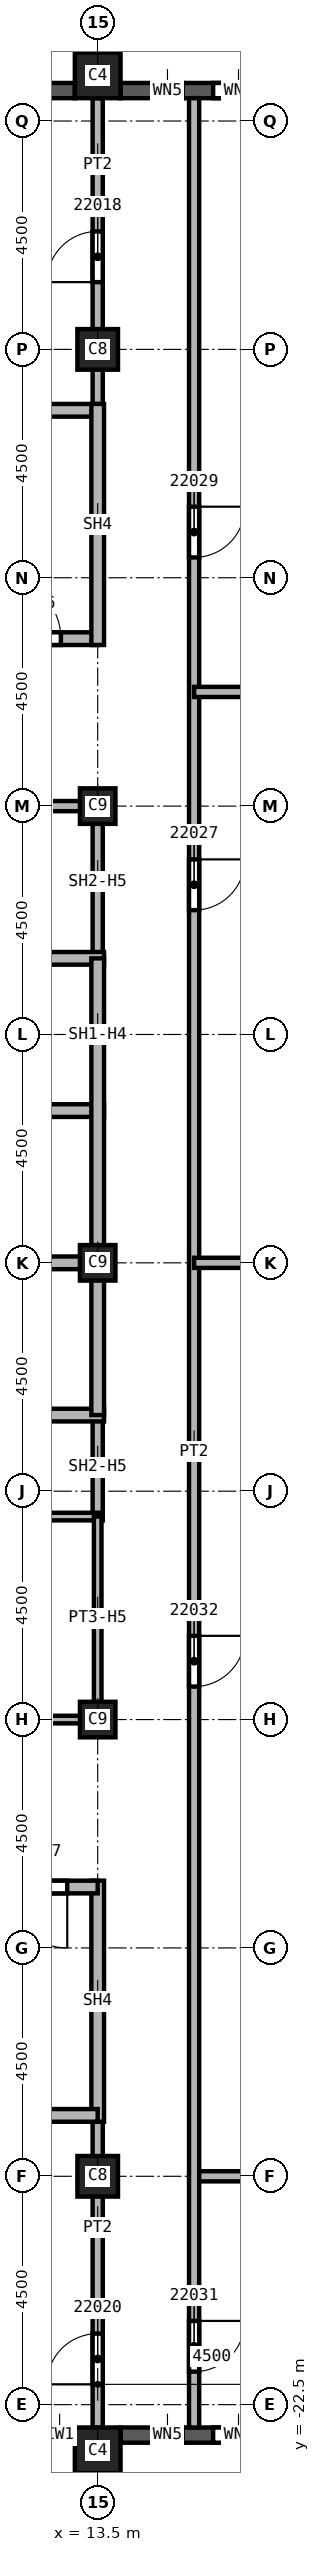
"""IFC4 building model, lengths in metres.
Left out: names, types, materials, properties, quantities, classifications, styles, units other than length and angle.
Written with IfcOpenShell. Run it as: python <this file> out.ifc"""

import sys

from ifc_helpers import new_model, si_unit, direction, frame, frame_2d, origin, origin_2d, place, context, subcontext, project, spatial, rectangle, extrude, element, fill, save


model = new_model("IFC4")
c1 = context("Model", 3, precision=1e-05, world=origin(), true_north=direction((0.0, 1.0)))
c2 = subcontext(c1, "Body", "Model", "MODEL_VIEW")
j1 = project(units=[si_unit("LENGTHUNIT", "METRE"), si_unit("PLANEANGLEUNIT", "RADIAN")], contexts=[c1])
p1 = place(None, origin())
s1 = spatial("IfcSite", under=j1, at=p1, CompositionType="ELEMENT")
p2 = place(p1, origin())
s2 = spatial("IfcBuilding", under=s1, at=p2, CompositionType="ELEMENT")
p3 = place(p2, frame((0.0, 0.0, 316.0)))
s3 = spatial("IfcBuildingStorey", under=s2, at=p3, CompositionType="ELEMENT", Elevation=316.0)
for number, where, z_axis, x_axis in (
    (1, (13.5, 18.0, 0.0), (0.0, 0.0, 1.0), (1.0, 0.0, 0.0)),
    (2, (13.5, -18.0, 0.0), (0.0, 0.0, 1.0), (1.0, 0.0, 0.0)),
):
    element("IfcColumn", number, at=place(p3, frame(where, z_axis=z_axis, x_axis=x_axis)), inside=s3, PredefinedType="COLUMN", context=c2, shape_type="SweptSolid", body=[
        extrude(rectangle(XDim=0.8, YDim=0.8, at=origin_2d()), origin(), (0.0, 0.0, 1.0), 3.59),
    ])
for number, where, z_axis, x_axis in (
    (3, (13.5, 0.0, 0.0), (0.0, 0.0, 1.0), (1.0, 0.0, 0.0)),
    (4, (13.5, 9.0, 0.0), (0.0, 0.0, 1.0), (1.0, 0.0, 0.0)),
    (5, (13.5, -9.0, 0.0), (0.0, 0.0, 1.0), (1.0, 0.0, 0.0)),
):
    element("IfcColumn", number, at=place(p3, frame(where, z_axis=z_axis, x_axis=x_axis)), inside=s3, PredefinedType="COLUMN", context=c2, shape_type="SweptSolid", body=[
        extrude(rectangle(XDim=0.7, YDim=0.7, at=origin_2d()), origin(), (0.0, 0.0, 1.0), 3.59),
    ])
for number, where, z_axis, x_axis in (
    (6, (13.5, 23.4, 0.0), (0.0, 0.0, 1.0), (1.0, 0.0, 0.0)),
    (7, (13.5, -23.4, 0.0), (0.0, 0.0, 1.0), (1.0, 0.0, 0.0)),
):
    element("IfcColumn", number, at=place(p3, frame(where, z_axis=z_axis, x_axis=x_axis)), inside=s3, PredefinedType="COLUMN", context=c2, shape_type="SweptSolid", body=[
        extrude(rectangle(XDim=0.9, YDim=0.9, at=origin_2d()), origin(), (0.0, 0.0, 1.0), 3.59),
    ])
p4 = place(p3, frame((9.45, -23.1, 0.0), z_axis=(0.0, 0.0, 1.0), x_axis=(1.0, 0.0, 0.0)))
e8 = element("IfcWall", 8, at=p4, inside=s3, PredefinedType="SOLIDWALL", context=c2, shape_type="SweptSolid", body=[
    extrude(rectangle(XDim=3.6, YDim=0.3, at=frame_2d((1.8, 0.0))), origin(), (0.0, 0.0, 1.0), 2.99),
])
p5 = place(p4, frame((0.6, 0.0, 0.8)))
e9 = element("IfcOpeningElement", 9, at=p5, cuts=e8, PredefinedType="OPENING", context=c2, shape_type="SweptSolid", body=[
    extrude(rectangle(XDim=2.4, YDim=1.95, at=frame_2d((1.2, 0.975))), frame((0.0, 0.15, 0.0), z_axis=(0.0, -1.0, 0.0), x_axis=(1.0, 0.0, 0.0)), (0.0, 0.0, 1.0), 0.3),
])
p6 = place(p3, frame((13.95, -23.1, 0.0), z_axis=(0.0, 0.0, 1.0), x_axis=(1.0, 0.0, 0.0)))
e10 = element("IfcWall", 10, at=p6, inside=s3, PredefinedType="SOLIDWALL", context=c2, shape_type="SweptSolid", body=[
    extrude(rectangle(XDim=3.6, YDim=0.3, at=frame_2d((1.8, 0.0))), origin(), (0.0, 0.0, 1.0), 2.99),
])
p7 = place(p6, frame((0.625, 0.0, 0.8)))
e11 = element("IfcOpeningElement", 11, at=p7, cuts=e10, PredefinedType="OPENING", context=c2, shape_type="SweptSolid", body=[
    extrude(rectangle(XDim=0.6, YDim=1.95, at=frame_2d((0.3, 0.975))), frame((0.0, 0.15, 0.0), z_axis=(0.0, -1.0, 0.0), x_axis=(1.0, 0.0, 0.0)), (0.0, 0.0, 1.0), 0.3),
])
p8 = place(p6, frame((1.825, 0.0, 0.8)))
e12 = element("IfcOpeningElement", 12, at=p8, cuts=e10, PredefinedType="OPENING", context=c2, shape_type="SweptSolid", body=[
    extrude(rectangle(XDim=1.0, YDim=1.95, at=frame_2d((0.5, 0.975))), frame((0.0, 0.15, 0.0), z_axis=(0.0, -1.0, 0.0), x_axis=(1.0, 0.0, 0.0)), (0.0, 0.0, 1.0), 0.3),
])
p9 = place(p3, frame((17.55, 23.1, 0.0), z_axis=(0.0, 0.0, 1.0), x_axis=(-1.0, 0.0, 0.0)))
e13 = element("IfcWall", 13, at=p9, inside=s3, PredefinedType="SOLIDWALL", context=c2, shape_type="SweptSolid", body=[
    extrude(rectangle(XDim=3.6, YDim=0.3, at=frame_2d((1.8, 0.0))), origin(), (0.0, 0.0, 1.0), 2.99),
])
p10 = place(p9, frame((0.775, 0.0, 0.8)))
e14 = element("IfcOpeningElement", 14, at=p10, cuts=e13, PredefinedType="OPENING", context=c2, shape_type="SweptSolid", body=[
    extrude(rectangle(XDim=1.0, YDim=1.95, at=frame_2d((0.5, 0.975))), frame((0.0, 0.15, 0.0), z_axis=(0.0, -1.0, 0.0), x_axis=(1.0, 0.0, 0.0)), (0.0, 0.0, 1.0), 0.3),
])
p11 = place(p9, frame((2.375, 0.0, 0.8)))
e15 = element("IfcOpeningElement", 15, at=p11, cuts=e13, PredefinedType="OPENING", context=c2, shape_type="SweptSolid", body=[
    extrude(rectangle(XDim=0.6, YDim=1.95, at=frame_2d((0.3, 0.975))), frame((0.0, 0.15, 0.0), z_axis=(0.0, -1.0, 0.0), x_axis=(1.0, 0.0, 0.0)), (0.0, 0.0, 1.0), 0.3),
])
p12 = place(p3, frame((13.05, 23.1, 0.0), z_axis=(0.0, 0.0, 1.0), x_axis=(-1.0, 0.0, 0.0)))
e16 = element("IfcWall", 16, at=p12, inside=s3, PredefinedType="SOLIDWALL", context=c2, shape_type="SweptSolid", body=[
    extrude(rectangle(XDim=3.6, YDim=0.3, at=frame_2d((1.8, 0.0))), origin(), (0.0, 0.0, 1.0), 2.99),
])
p13 = place(p12, frame((0.6, 0.0, 0.8)))
e17 = element("IfcOpeningElement", 17, at=p13, cuts=e16, PredefinedType="OPENING", context=c2, shape_type="SweptSolid", body=[
    extrude(rectangle(XDim=2.4, YDim=1.95, at=frame_2d((1.2, 0.975))), frame((0.0, 0.15, 0.0), z_axis=(0.0, -1.0, 0.0), x_axis=(1.0, 0.0, 0.0)), (0.0, 0.0, 1.0), 0.3),
])
p14 = place(p3, frame((13.5, -22.95, 0.0), z_axis=(0.0, 0.0, 1.0), x_axis=(0.0, 1.0, 0.0)))
e18 = element("IfcWall", 18, at=p14, inside=s3, PredefinedType="PARTITIONING", context=c2, shape_type="SweptSolid", body=[
    extrude(rectangle(XDim=6.275, YDim=0.2, at=frame_2d((3.137, 0.0))), origin(), (0.0, 0.0, 1.0), 3.59),
])
p15 = place(p14, frame((0.85, 0.0, 0.0)))
e19 = element("IfcOpeningElement", 19, at=p15, cuts=e18, PredefinedType="OPENING", context=c2, shape_type="SweptSolid", body=[
    extrude(rectangle(XDim=1.0, YDim=2.1, at=frame_2d((0.5, 1.05))), frame((0.0, 0.1, 0.0), z_axis=(0.0, -1.0, 0.0), x_axis=(1.0, 0.0, 0.0)), (0.0, 0.0, 1.0), 0.2),
])
p16 = place(p3, frame((13.5, 16.675, 0.0), z_axis=(0.0, 0.0, 1.0), x_axis=(0.0, 1.0, 0.0)))
e20 = element("IfcWall", 20, at=p16, inside=s3, PredefinedType="PARTITIONING", context=c2, shape_type="SweptSolid", body=[
    extrude(rectangle(XDim=6.275, YDim=0.2, at=frame_2d((3.137, 0.0))), origin(), (0.0, 0.0, 1.0), 3.59),
])
p17 = place(p16, frame((2.65, 0.0, 0.0)))
e21 = element("IfcOpeningElement", 21, at=p17, cuts=e20, PredefinedType="OPENING", context=c2, shape_type="SweptSolid", body=[
    extrude(rectangle(XDim=1.0, YDim=2.1, at=frame_2d((0.5, 1.05))), frame((0.0, 0.1, 0.0), z_axis=(0.0, -1.0, 0.0), x_axis=(1.0, 0.0, 0.0)), (0.0, 0.0, 1.0), 0.2),
])
p18 = place(p3, frame((15.4, -18.0, 0.0), z_axis=(0.0, 0.0, 1.0), x_axis=(1.0, 0.0, 0.0)))
e22 = element("IfcWall", 22, at=p18, inside=s3, PredefinedType="PARTITIONING", context=c2, shape_type="SweptSolid", body=[
    extrude(rectangle(XDim=5.25, YDim=0.2, at=frame_2d((2.625, 0.0))), origin(), (0.0, 0.0, 1.0), 3.59),
])
p19 = place(p3, frame((15.4, 22.95, 0.0), z_axis=(0.0, 0.0, 1.0), x_axis=(0.0, -1.0, 0.0)))
e23 = element("IfcWall", 23, at=p19, inside=s3, PredefinedType="PARTITIONING", context=c2, shape_type="SweptSolid", body=[
    extrude(rectangle(XDim=45.9, YDim=0.2, at=frame_2d((22.95, 0.0))), origin(), (0.0, 0.0, 1.0), 3.59),
])
p20 = place(p19, frame((15.0, 0.0, 0.0)))
e24 = element("IfcOpeningElement", 24, at=p20, cuts=e23, PredefinedType="OPENING", context=c2, shape_type="SweptSolid", body=[
    extrude(rectangle(XDim=1.0, YDim=2.1, at=frame_2d((0.5, 1.05))), frame((0.0, 0.1, 0.0), z_axis=(0.0, -1.0, 0.0), x_axis=(1.0, 0.0, 0.0)), (0.0, 0.0, 1.0), 0.2),
])
p21 = place(p19, frame((8.05, 0.0, 0.0)))
e25 = element("IfcOpeningElement", 25, at=p21, cuts=e23, PredefinedType="OPENING", context=c2, shape_type="SweptSolid", body=[
    extrude(rectangle(XDim=1.0, YDim=2.1, at=frame_2d((0.5, 1.05))), frame((0.0, 0.1, 0.0), z_axis=(0.0, -1.0, 0.0), x_axis=(1.0, 0.0, 0.0)), (0.0, 0.0, 1.0), 0.2),
])
p22 = place(p19, frame((43.8, 0.0, 0.0)))
e26 = element("IfcOpeningElement", 26, at=p22, cuts=e23, PredefinedType="OPENING", context=c2, shape_type="SweptSolid", body=[
    extrude(rectangle(XDim=1.0, YDim=2.1, at=frame_2d((0.5, 1.05))), frame((0.0, 0.1, 0.0), z_axis=(0.0, -1.0, 0.0), x_axis=(1.0, 0.0, 0.0)), (0.0, 0.0, 1.0), 0.2),
])
p23 = place(p19, frame((30.3, 0.0, 0.0)))
e27 = element("IfcOpeningElement", 27, at=p23, cuts=e23, PredefinedType="OPENING", context=c2, shape_type="SweptSolid", body=[
    extrude(rectangle(XDim=1.0, YDim=2.1, at=frame_2d((0.5, 1.05))), frame((0.0, 0.1, 0.0), z_axis=(0.0, -1.0, 0.0), x_axis=(1.0, 0.0, 0.0)), (0.0, 0.0, 1.0), 0.2),
])
for number, where, z_axis, x_axis in (
    (28, (15.4, 11.25, 0.0), (0.0, 0.0, 1.0), (1.0, 0.0, 0.0)),
    (29, (26.55, 0.0, 0.0), (0.0, 0.0, 1.0), (-1.0, 0.0, 0.0)),
):
    element("IfcWall", number, at=place(p3, frame(where, z_axis=z_axis, x_axis=x_axis)), inside=s3, PredefinedType="PARTITIONING", context=c2, shape_type="SweptSolid", body=[
        extrude(rectangle(XDim=11.15, YDim=0.2, at=frame_2d((5.575, 0.0))), origin(), (0.0, 0.0, 1.0), 3.59),
    ])
p24 = place(p3, frame((10.5, 9.0, 0.0), z_axis=(0.0, 0.0, 1.0), x_axis=(1.0, 0.0, 0.0)))
e30 = element("IfcWall", 30, at=p24, inside=s3, PredefinedType="SOLIDWALL", context=c2, shape_type="SweptSolid", body=[
    extrude(rectangle(XDim=3.0, YDim=0.2, at=frame_2d((1.5, 0.0))), origin(), (0.0, 0.0, 1.0), 2.828),
])
p25 = place(p3, frame((13.5, -3.0, 0.0), z_axis=(0.0, 0.0, 1.0), x_axis=(0.0, -1.0, 0.0)))
e31 = element("IfcWall", 31, at=p25, inside=s3, PredefinedType="SOLIDWALL", context=c2, shape_type="SweptSolid", body=[
    extrude(rectangle(XDim=2.0, YDim=0.2, at=frame_2d((1.0, 0.0))), origin(), (0.0, 0.0, 1.0), 2.828),
])
p26 = place(p3, frame((13.5, 9.1, 0.0), z_axis=(0.0, 0.0, 1.0), x_axis=(0.0, -1.0, 0.0)))
e32 = element("IfcWall", 32, at=p26, inside=s3, PredefinedType="SOLIDWALL", context=c2, shape_type="SweptSolid", body=[
    extrude(rectangle(XDim=3.1, YDim=0.2, at=frame_2d((1.55, 0.0))), origin(), (0.0, 0.0, 1.0), 2.828),
])
p27 = place(p3, frame((7.5, -3.0, 0.0), z_axis=(0.0, 0.0, 1.0), x_axis=(1.0, 0.0, 0.0)))
e33 = element("IfcWall", 33, at=p27, inside=s3, PredefinedType="SOLIDWALL", context=c2, shape_type="SweptSolid", body=[
    extrude(rectangle(XDim=6.125, YDim=0.25, at=frame_2d((3.062, 0.0))), origin(), (0.0, 0.0, 1.0), 3.59),
])
p28 = place(p27, frame((1.75, 0.0, 0.0)))
e34 = element("IfcOpeningElement", 34, at=p28, cuts=e33, PredefinedType="OPENING", context=c2, shape_type="SweptSolid", body=[
    extrude(rectangle(XDim=1.1, YDim=2.1, at=frame_2d((0.55, 1.05))), frame((0.0, 0.125, 0.0), z_axis=(0.0, -1.0, 0.0), x_axis=(1.0, 0.0, 0.0)), (0.0, 0.0, 1.0), 0.25),
])
p29 = place(p3, frame((7.5, 3.0, 0.0), z_axis=(0.0, 0.0, 1.0), x_axis=(1.0, 0.0, 0.0)))
e35 = element("IfcWall", 35, at=p29, inside=s3, PredefinedType="SOLIDWALL", context=c2, shape_type="SweptSolid", body=[
    extrude(rectangle(XDim=6.125, YDim=0.25, at=frame_2d((3.062, 0.0))), origin(), (0.0, 0.0, 1.0), 3.59),
])
p30 = place(p29, frame((1.75, 0.0, 0.0)))
e36 = element("IfcOpeningElement", 36, at=p30, cuts=e35, PredefinedType="OPENING", context=c2, shape_type="SweptSolid", body=[
    extrude(rectangle(XDim=1.1, YDim=2.1, at=frame_2d((0.55, 1.05))), frame((0.0, 0.125, 0.0), z_axis=(0.0, -1.0, 0.0), x_axis=(1.0, 0.0, 0.0)), (0.0, 0.0, 1.0), 0.25),
])
for number, where, z_axis, x_axis in (
    (37, (10.5, 0.0, 0.0), (0.0, 0.0, 1.0), (1.0, 0.0, 0.0)),
    (38, (10.5, 6.0, 0.0), (0.0, 0.0, 1.0), (1.0, 0.0, 0.0)),
):
    element("IfcWall", number, at=place(p3, frame(where, z_axis=z_axis, x_axis=x_axis)), inside=s3, PredefinedType="SOLIDWALL", context=c2, shape_type="SweptSolid", body=[
        extrude(rectangle(XDim=3.125, YDim=0.25, at=frame_2d((1.562, 0.0))), origin(), (0.0, 0.0, 1.0), 3.59),
    ])
p31 = place(p3, frame((13.5, 6.0, 0.0), z_axis=(0.0, 0.0, 1.0), x_axis=(0.0, -1.0, 0.0)))
e39 = element("IfcWall", 39, at=p31, inside=s3, PredefinedType="SOLIDWALL", context=c2, shape_type="SweptSolid", body=[
    extrude(rectangle(XDim=9.0, YDim=0.25, at=frame_2d((4.5, 0.0))), origin(), (0.0, 0.0, 1.0), 2.828),
])
p32 = place(p3, frame((4.375, 12.3, 0.0), z_axis=(0.0, 0.0, 1.0), x_axis=(1.0, 0.0, 0.0)))
e40 = element("IfcWall", 40, at=p32, inside=s3, PredefinedType="SOLIDWALL", context=c2, shape_type="SweptSolid", body=[
    extrude(rectangle(XDim=9.125, YDim=0.25, at=frame_2d((4.562, 0.0))), origin(), (0.0, 0.0, 1.0), 3.59),
])
p33 = place(p32, frame((7.2, 0.0, 0.0)))
e41 = element("IfcOpeningElement", 41, at=p33, cuts=e40, PredefinedType="OPENING", context=c2, shape_type="SweptSolid", body=[
    extrude(rectangle(XDim=1.2, YDim=2.1, at=frame_2d((0.6, 1.05))), frame((0.0, 0.125, 0.0), z_axis=(0.0, -1.0, 0.0), x_axis=(1.0, 0.0, 0.0)), (0.0, 0.0, 1.0), 0.25),
])
p34 = place(p3, frame((4.375, 16.8, 0.0), z_axis=(0.0, 0.0, 1.0), x_axis=(1.0, 0.0, 0.0)))
e42 = element("IfcWall", 42, at=p34, inside=s3, PredefinedType="SOLIDWALL", context=c2, shape_type="SweptSolid", body=[
    extrude(rectangle(XDim=9.125, YDim=0.25, at=frame_2d((4.562, 0.0))), origin(), (0.0, 0.0, 1.0), 3.59),
])
p35 = place(p3, frame((13.5, -16.925, 0.0), z_axis=(0.0, 0.0, 1.0), x_axis=(0.0, 1.0, 0.0)))
e43 = element("IfcWall", 43, at=p35, inside=s3, PredefinedType="SOLIDWALL", context=c2, shape_type="SweptSolid", body=[
    extrude(rectangle(XDim=4.75, YDim=0.25, at=frame_2d((2.375, 0.0))), origin(), (0.0, 0.0, 1.0), 3.59),
])
p36 = place(p3, frame((13.5, -16.8, 0.0), z_axis=(0.0, 0.0, 1.0), x_axis=(-1.0, 0.0, 0.0)))
e44 = element("IfcWall", 44, at=p36, inside=s3, PredefinedType="SOLIDWALL", context=c2, shape_type="SweptSolid", body=[
    extrude(rectangle(XDim=9.125, YDim=0.25, at=frame_2d((4.562, 0.0))), origin(), (0.0, 0.0, 1.0), 3.59),
])
p37 = place(p3, frame((13.5, -12.3, 0.0), z_axis=(0.0, 0.0, 1.0), x_axis=(-1.0, 0.0, 0.0)))
e45 = element("IfcWall", 45, at=p37, inside=s3, PredefinedType="SOLIDWALL", context=c2, shape_type="SweptSolid", body=[
    extrude(rectangle(XDim=9.125, YDim=0.25, at=frame_2d((4.562, 0.0))), origin(), (0.0, 0.0, 1.0), 3.59),
])
p38 = place(p37, frame((0.6, 0.0, 0.0)))
e46 = element("IfcOpeningElement", 46, at=p38, cuts=e45, PredefinedType="OPENING", context=c2, shape_type="SweptSolid", body=[
    extrude(rectangle(XDim=1.2, YDim=2.1, at=frame_2d((0.6, 1.05))), frame((0.0, 0.125, 0.0), z_axis=(0.0, -1.0, 0.0), x_axis=(1.0, 0.0, 0.0)), (0.0, 0.0, 1.0), 0.25),
])
p39 = place(p3, frame((13.5, 12.175, 0.0), z_axis=(0.0, 0.0, 1.0), x_axis=(0.0, 1.0, 0.0)))
e47 = element("IfcWall", 47, at=p39, inside=s3, PredefinedType="SOLIDWALL", context=c2, shape_type="SweptSolid", body=[
    extrude(rectangle(XDim=4.75, YDim=0.25, at=frame_2d((2.375, 0.0))), origin(), (0.0, 0.0, 1.0), 3.59),
])
p40 = place(p3, frame((10.5, -5.0, 0.0), z_axis=(0.0, 0.0, 1.0), x_axis=(1.0, 0.0, 0.0)))
e48 = element("IfcWall", 48, at=p40, inside=s3, PredefinedType="PARTITIONING", context=c2, shape_type="SweptSolid", body=[
    extrude(rectangle(XDim=3.1, YDim=0.15, at=frame_2d((1.55, 0.0))), origin(), (0.0, 0.0, 1.0), 3.59),
])
p41 = place(p3, frame((13.5, -9.0, 0.0), z_axis=(0.0, 0.0, 1.0), x_axis=(-1.0, 0.0, 0.0)))
e49 = element("IfcWall", 49, at=p41, inside=s3, PredefinedType="PARTITIONING", context=c2, shape_type="SweptSolid", body=[
    extrude(rectangle(XDim=3.0, YDim=0.15, at=frame_2d((1.5, 0.0))), origin(), (0.0, 0.0, 1.0), 2.828),
])
p42 = place(p3, frame((13.5, -5.0, 0.0), z_axis=(0.0, 0.0, 1.0), x_axis=(0.0, -1.0, 0.0)))
e50 = element("IfcWall", 50, at=p42, inside=s3, PredefinedType="PARTITIONING", context=c2, shape_type="SweptSolid", body=[
    extrude(rectangle(XDim=4.075, YDim=0.15, at=frame_2d((2.038, 0.0))), origin(), (0.0, 0.0, 1.0), 2.828),
])
p43 = place(p33, origin())
e51 = element("IfcDoor", 51, at=p43, inside=s3, OperationType="SINGLE_SWING_LEFT", PredefinedType="DOOR", context=c2, shape_type="SweptSolid", body=[
    extrude(rectangle(XDim=1.2, YDim=2.1, at=frame_2d((0.6, 1.05))), frame((0.0, 0.025, 0.0), z_axis=(0.0, -1.0, 0.0), x_axis=(1.0, 0.0, 0.0)), (0.0, 0.0, 1.0), 0.05),
])
fill(e41, e51)
p44 = place(p38, origin())
e52 = element("IfcDoor", 52, at=p44, inside=s3, OperationType="SINGLE_SWING_RIGHT", PredefinedType="DOOR", context=c2, shape_type="SweptSolid", body=[
    extrude(rectangle(XDim=1.2, YDim=2.1, at=frame_2d((0.6, 1.05))), frame((0.0, 0.025, 0.0), z_axis=(0.0, -1.0, 0.0), x_axis=(1.0, 0.0, 0.0)), (0.0, 0.0, 1.0), 0.05),
])
fill(e46, e52)
p45 = place(p17, origin())
e53 = element("IfcDoor", 53, at=p45, inside=s3, OperationType="SINGLE_SWING_LEFT", PredefinedType="DOOR", context=c2, shape_type="SweptSolid", body=[
    extrude(rectangle(XDim=1.0, YDim=2.1, at=frame_2d((0.5, 1.05))), frame((0.0, 0.025, 0.0), z_axis=(0.0, -1.0, 0.0), x_axis=(1.0, 0.0, 0.0)), (0.0, 0.0, 1.0), 0.05),
])
fill(e21, e53)
p46 = place(p15, origin())
e54 = element("IfcDoor", 54, at=p46, inside=s3, OperationType="SINGLE_SWING_LEFT", PredefinedType="DOOR", context=c2, shape_type="SweptSolid", body=[
    extrude(rectangle(XDim=1.0, YDim=2.1, at=frame_2d((0.5, 1.05))), frame((0.0, 0.025, 0.0), z_axis=(0.0, -1.0, 0.0), x_axis=(1.0, 0.0, 0.0)), (0.0, 0.0, 1.0), 0.05),
])
fill(e19, e54)
p47 = place(p20, origin())
e55 = element("IfcDoor", 55, at=p47, inside=s3, OperationType="SINGLE_SWING_RIGHT", PredefinedType="DOOR", context=c2, shape_type="SweptSolid", body=[
    extrude(rectangle(XDim=1.0, YDim=2.1, at=frame_2d((0.5, 1.05))), frame((0.0, 0.025, 0.0), z_axis=(0.0, -1.0, 0.0), x_axis=(1.0, 0.0, 0.0)), (0.0, 0.0, 1.0), 0.05),
])
fill(e24, e55)
p48 = place(p21, origin())
e56 = element("IfcDoor", 56, at=p48, inside=s3, OperationType="SINGLE_SWING_RIGHT", PredefinedType="DOOR", context=c2, shape_type="SweptSolid", body=[
    extrude(rectangle(XDim=1.0, YDim=2.1, at=frame_2d((0.5, 1.05))), frame((0.0, 0.025, 0.0), z_axis=(0.0, -1.0, 0.0), x_axis=(1.0, 0.0, 0.0)), (0.0, 0.0, 1.0), 0.05),
])
fill(e25, e56)
p49 = place(p22, origin())
e57 = element("IfcDoor", 57, at=p49, inside=s3, OperationType="SINGLE_SWING_RIGHT", PredefinedType="DOOR", context=c2, shape_type="SweptSolid", body=[
    extrude(rectangle(XDim=1.0, YDim=2.1, at=frame_2d((0.5, 1.05))), frame((0.0, 0.025, 0.0), z_axis=(0.0, -1.0, 0.0), x_axis=(1.0, 0.0, 0.0)), (0.0, 0.0, 1.0), 0.05),
])
fill(e26, e57)
p50 = place(p23, origin())
e58 = element("IfcDoor", 58, at=p50, inside=s3, OperationType="SINGLE_SWING_LEFT", PredefinedType="DOOR", context=c2, shape_type="SweptSolid", body=[
    extrude(rectangle(XDim=1.0, YDim=2.1, at=frame_2d((0.5, 1.05))), frame((0.0, 0.025, 0.0), z_axis=(0.0, -1.0, 0.0), x_axis=(1.0, 0.0, 0.0)), (0.0, 0.0, 1.0), 0.05),
])
fill(e27, e58)
p51 = place(p7, origin())
e59 = element("IfcWindow", 59, at=p51, inside=s3, PartitioningType="SINGLE_PANEL", PredefinedType="WINDOW", context=c2, shape_type="SweptSolid", body=[
    extrude(rectangle(XDim=0.6, YDim=1.95, at=frame_2d((0.3, 0.975))), frame((0.0, 0.03, 0.0), z_axis=(0.0, -1.0, 0.0), x_axis=(1.0, 0.0, 0.0)), (0.0, 0.0, 1.0), 0.06),
])
fill(e11, e59)
p52 = place(p8, origin())
e60 = element("IfcWindow", 60, at=p52, inside=s3, PartitioningType="SINGLE_PANEL", PredefinedType="WINDOW", context=c2, shape_type="SweptSolid", body=[
    extrude(rectangle(XDim=1.0, YDim=1.95, at=frame_2d((0.5, 0.975))), frame((0.0, 0.03, 0.0), z_axis=(0.0, -1.0, 0.0), x_axis=(1.0, 0.0, 0.0)), (0.0, 0.0, 1.0), 0.06),
])
fill(e12, e60)
p53 = place(p10, origin())
e61 = element("IfcWindow", 61, at=p53, inside=s3, PartitioningType="SINGLE_PANEL", PredefinedType="WINDOW", context=c2, shape_type="SweptSolid", body=[
    extrude(rectangle(XDim=1.0, YDim=1.95, at=frame_2d((0.5, 0.975))), frame((0.0, 0.03, 0.0), z_axis=(0.0, -1.0, 0.0), x_axis=(1.0, 0.0, 0.0)), (0.0, 0.0, 1.0), 0.06),
])
fill(e14, e61)
p54 = place(p11, origin())
e62 = element("IfcWindow", 62, at=p54, inside=s3, PartitioningType="SINGLE_PANEL", PredefinedType="WINDOW", context=c2, shape_type="SweptSolid", body=[
    extrude(rectangle(XDim=0.6, YDim=1.95, at=frame_2d((0.3, 0.975))), frame((0.0, 0.03, 0.0), z_axis=(0.0, -1.0, 0.0), x_axis=(1.0, 0.0, 0.0)), (0.0, 0.0, 1.0), 0.06),
])
fill(e15, e62)
save(model, sys.argv[1])
